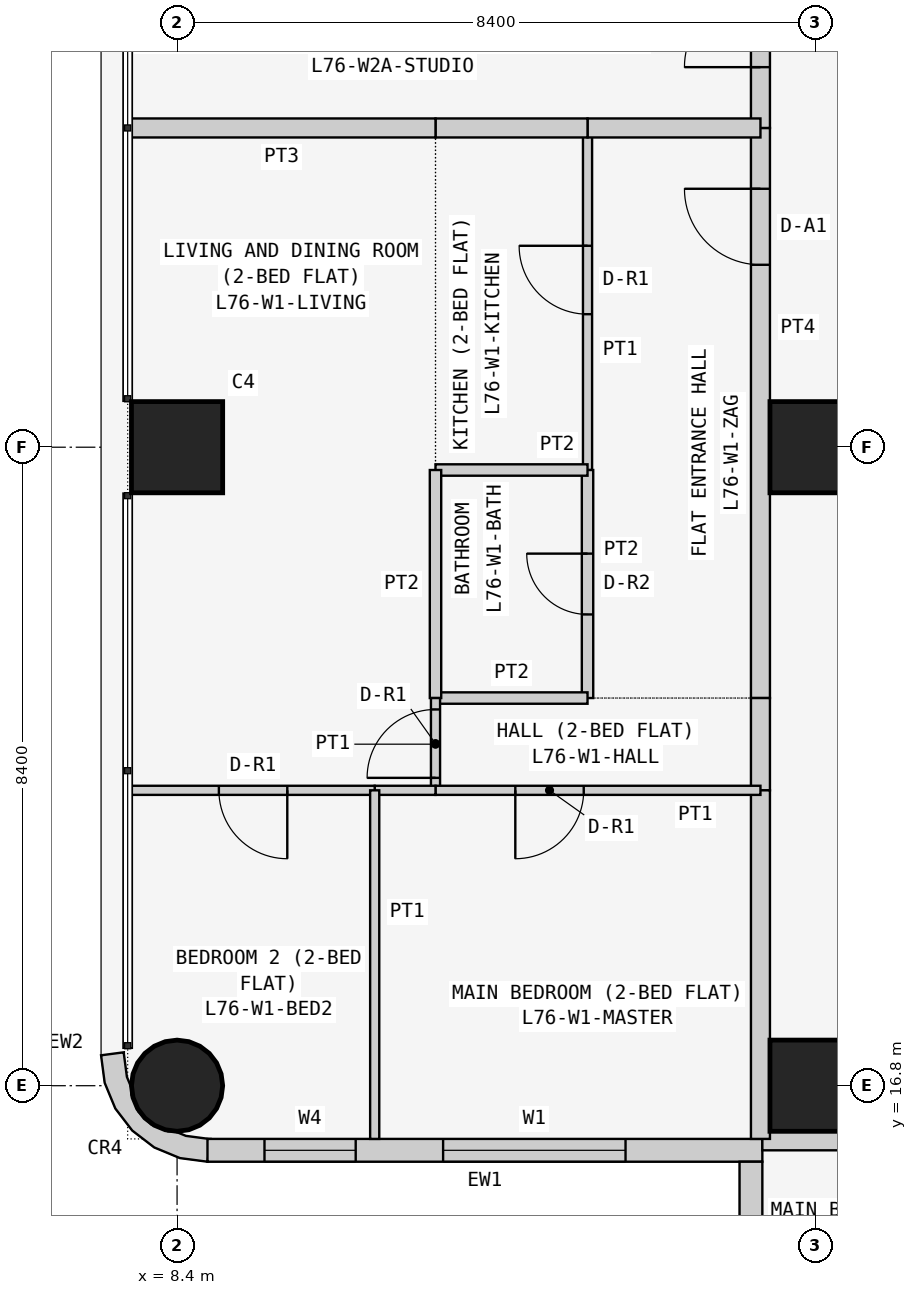
"""IFC4 building model, lengths in metres.
Left out: names, types, materials, properties, quantities, classifications, styles, units other than length and angle.
Written with IfcOpenShell. Run it as: python <this file> out.ifc"""

import sys

from ifc_helpers import new_model, si_unit, direction, frame, frame_2d, origin, origin_2d, place, context, subcontext, project, spatial, polyline, rectangle, circle, outline, extrude, element, fill, save


model = new_model("IFC4")
c1 = context("Model", 3, precision=1e-05, world=origin(), true_north=direction((0.0, 1.0)))
c2 = subcontext(c1, "Body", "Model", "MODEL_VIEW")
j1 = project(units=[si_unit("LENGTHUNIT", "METRE"), si_unit("PLANEANGLEUNIT", "RADIAN")], contexts=[c1])
p1 = place(None, origin())
s1 = spatial("IfcSite", under=j1, at=p1, CompositionType="ELEMENT")
p2 = place(p1, origin())
s2 = spatial("IfcBuilding", under=s1, at=p2, CompositionType="ELEMENT")
p3 = place(p2, frame((0.0, 0.0, 290.1)))
s3 = spatial("IfcBuildingStorey", under=s2, at=p3, CompositionType="ELEMENT", Elevation=290.1)
p4 = place(p3, frame((8.4, 16.8, 0.0), z_axis=(0.0, 0.0, 1.0), x_axis=(1.0, 0.0, 0.0)))
e1 = element("IfcColumn", 1, at=p4, inside=s3, PredefinedType="COLUMN", context=c2, shape_type="SweptSolid", body=[
    extrude(circle(Radius=0.6, at=origin_2d()), origin(), (0.0, 0.0, 1.0), 3.6),
])
for number, where, z_axis, x_axis in (
    (2, (8.4, 25.2, 0.0), (0.0, 0.0, 1.0), (1.0, 0.0, 0.0)),
    (3, (16.8, 16.8, 0.0), (0.0, 0.0, 1.0), (1.0, 0.0, 0.0)),
    (4, (16.8, 25.2, 0.0), (0.0, 0.0, 1.0), (1.0, 0.0, 0.0)),
):
    element("IfcColumn", number, at=place(p3, frame(where, z_axis=z_axis, x_axis=x_axis)), inside=s3, PredefinedType="COLUMN", context=c2, shape_type="SweptSolid", body=[
        extrude(rectangle(XDim=1.2, YDim=1.2, at=origin_2d()), origin(), (0.0, 0.0, 1.0), 3.6),
    ])
p5 = place(p3, frame((8.8, 15.95, 0.0), z_axis=(0.0, 0.0, 1.0), x_axis=(1.0, 0.0, 0.0)))
e5 = element("IfcWall", 5, at=p5, inside=s3, PredefinedType="SOLIDWALL", context=c2, shape_type="SweptSolid", body=[
    extrude(rectangle(XDim=7.3, YDim=0.3, at=frame_2d((3.65, 0.0))), origin(), (0.0, 0.0, 1.0), 3.45),
])
p6 = place(p5, frame((3.1, 0.0, 0.9)))
e6 = element("IfcOpeningElement", 6, at=p6, cuts=e5, PredefinedType="OPENING", context=c2, shape_type="SweptSolid", body=[
    extrude(rectangle(XDim=2.4, YDim=1.5, at=frame_2d((1.2, 0.75))), frame((0.0, 0.16, 0.0), z_axis=(0.0, -1.0, 0.0), x_axis=(1.0, 0.0, 0.0)), (0.0, 0.0, 1.0), 0.32),
])
p7 = place(p5, frame((0.75, 0.0, 0.9)))
e7 = element("IfcOpeningElement", 7, at=p7, cuts=e5, PredefinedType="OPENING", context=c2, shape_type="SweptSolid", body=[
    extrude(rectangle(XDim=1.2, YDim=1.5, at=frame_2d((0.6, 0.75))), frame((0.0, 0.16, 0.0), z_axis=(0.0, -1.0, 0.0), x_axis=(1.0, 0.0, 0.0)), (0.0, 0.0, 1.0), 0.32),
])
p8 = place(p3, frame((15.95, 15.8, 0.0), z_axis=(0.0, 0.0, 1.0), x_axis=(0.0, -1.0, 0.0)))
e8 = element("IfcWall", 8, at=p8, inside=s3, PredefinedType="SOLIDWALL", context=c2, shape_type="SweptSolid", body=[
    extrude(rectangle(XDim=7.0, YDim=0.3, at=frame_2d((3.5, 0.0))), origin(), (0.0, 0.0, 1.0), 3.45),
])
p9 = place(p8, frame((1.5, 0.0, 0.9)))
e9 = element("IfcOpeningElement", 9, at=p9, cuts=e8, PredefinedType="OPENING", context=c2, shape_type="SweptSolid", body=[
    extrude(rectangle(XDim=2.4, YDim=1.5, at=frame_2d((1.2, 0.75))), frame((0.0, 0.16, 0.0), z_axis=(0.0, -1.0, 0.0), x_axis=(1.0, 0.0, 0.0)), (0.0, 0.0, 1.0), 0.32),
])
p10 = place(p8, frame((5.05, 0.0, 0.9)))
e10 = element("IfcOpeningElement", 10, at=p10, cuts=e8, PredefinedType="OPENING", context=c2, shape_type="SweptSolid", body=[
    extrude(rectangle(XDim=1.2, YDim=1.5, at=frame_2d((0.6, 0.75))), frame((0.0, 0.16, 0.0), z_axis=(0.0, -1.0, 0.0), x_axis=(1.0, 0.0, 0.0)), (0.0, 0.0, 1.0), 0.32),
])
p11 = place(p3, frame((7.824, 17.162, 0.0), z_axis=(0.0, 0.0, 1.0), x_axis=(-0.707106781187, -0.707106781187, 0.0)))
e11 = element("IfcWall", 11, at=p11, inside=s3, PredefinedType="SOLIDWALL", context=c2, shape_type="SweptSolid", body=[
    extrude(outline(polyline([(0.047, 1.454), (0.233, 1.212), (0.292, 1.069), (0.358, 1.003), (0.449, 0.782), (0.449, 0.543), (0.358, 0.323), (0.292, 0.257), (0.233, 0.114), (0.047, -0.129), (0.033, -0.143), (0.273, -0.327), (0.495, -0.037), (0.635, 0.301), (0.683, 0.663), (0.635, 1.025), (0.495, 1.363), (0.273, 1.653), (0.033, 1.469), (0.047, 1.454)])), origin(), (0.0, 0.0, 1.0), 3.45),
])
p12 = place(p3, frame((20.686, 16.075, 0.0), z_axis=(0.0, 0.0, 1.0), x_axis=(-1.0, 0.0, 0.0)))
e12 = element("IfcWall", 12, at=p12, inside=s3, PredefinedType="PARTITIONING", context=c2, shape_type="SweptSolid", body=[
    extrude(rectangle(XDim=4.586, YDim=0.25, at=frame_2d((2.293, 0.0))), origin(), (0.0, 0.0, 1.0), 3.45),
])
p13 = place(p3, frame((16.075, 21.9, 0.0), z_axis=(0.0, 0.0, 1.0), x_axis=(0.0, 1.0, 0.0)))
e13 = element("IfcWall", 13, at=p13, inside=s3, PredefinedType="PARTITIONING", context=c2, shape_type="SweptSolid", body=[
    extrude(rectangle(XDim=7.5, YDim=0.25, at=frame_2d((3.75, 0.0))), origin(), (0.0, 0.0, 1.0), 3.45),
])
p14 = place(p13, frame((5.7, 0.0, 0.0)))
e14 = element("IfcOpeningElement", 14, at=p14, cuts=e13, PredefinedType="OPENING", context=c2, shape_type="SweptSolid", body=[
    extrude(rectangle(XDim=1.0, YDim=2.1, at=frame_2d((0.5, 1.05))), frame((0.0, 0.135, 0.0), z_axis=(0.0, -1.0, 0.0), x_axis=(1.0, 0.0, 0.0)), (0.0, 0.0, 1.0), 0.27),
])
p15 = place(p3, frame((16.075, 20.686, 0.0), z_axis=(0.0, 0.0, 1.0), x_axis=(0.0, 1.0, 0.0)))
e15 = element("IfcWall", 15, at=p15, inside=s3, PredefinedType="PARTITIONING", context=c2, shape_type="SweptSolid", body=[
    extrude(rectangle(XDim=1.214, YDim=0.25, at=frame_2d((0.607, 0.0))), origin(), (0.0, 0.0, 1.0), 3.45),
])
p16 = place(p3, frame((16.075, 16.1, 0.0), z_axis=(0.0, 0.0, 1.0), x_axis=(0.0, 1.0, 0.0)))
e16 = element("IfcWall", 16, at=p16, inside=s3, PredefinedType="PARTITIONING", context=c2, shape_type="SweptSolid", body=[
    extrude(rectangle(XDim=4.586, YDim=0.25, at=frame_2d((2.293, 0.0))), origin(), (0.0, 0.0, 1.0), 3.45),
])
p17 = place(p3, frame((16.075, 29.4, 0.0), z_axis=(0.0, 0.0, 1.0), x_axis=(0.0, 1.0, 0.0)))
e17 = element("IfcWall", 17, at=p17, inside=s3, PredefinedType="PARTITIONING", context=c2, shape_type="SweptSolid", body=[
    extrude(rectangle(XDim=2.6, YDim=0.25, at=frame_2d((1.3, 0.0))), origin(), (0.0, 0.0, 1.0), 3.45),
])
p18 = place(p17, frame((0.8, 0.0, 0.0)))
e18 = element("IfcOpeningElement", 18, at=p18, cuts=e17, PredefinedType="OPENING", context=c2, shape_type="SweptSolid", body=[
    extrude(rectangle(XDim=1.0, YDim=2.1, at=frame_2d((0.5, 1.05))), frame((0.0, 0.135, 0.0), z_axis=(0.0, -1.0, 0.0), x_axis=(1.0, 0.0, 0.0)), (0.0, 0.0, 1.0), 0.27),
])
p19 = place(p3, frame((13.8, 29.4, 0.0), z_axis=(0.0, 0.0, 1.0), x_axis=(0.0, -1.0, 0.0)))
e19 = element("IfcWall", 19, at=p19, inside=s3, PredefinedType="PARTITIONING", context=c2, shape_type="SweptSolid", body=[
    extrude(rectangle(XDim=4.5, YDim=0.12, at=frame_2d((2.25, 0.0))), origin(), (0.0, 0.0, 1.0), 3.45),
])
p20 = place(p19, frame((1.55, 0.0, 0.0)))
e20 = element("IfcOpeningElement", 20, at=p20, cuts=e19, PredefinedType="OPENING", context=c2, shape_type="SweptSolid", body=[
    extrude(rectangle(XDim=0.9, YDim=2.1, at=frame_2d((0.45, 1.05))), frame((0.0, 0.07, 0.0), z_axis=(0.0, -1.0, 0.0), x_axis=(1.0, 0.0, 0.0)), (0.0, 0.0, 1.0), 0.14),
])
p21 = place(p3, frame((13.8, 24.9, 0.0), z_axis=(0.0, 0.0, 1.0), x_axis=(0.0, -1.0, 0.0)))
e21 = element("IfcWall", 21, at=p21, inside=s3, PredefinedType="PARTITIONING", context=c2, shape_type="SweptSolid", body=[
    extrude(rectangle(XDim=3.0, YDim=0.15, at=frame_2d((1.5, 0.0))), origin(), (0.0, 0.0, 1.0), 3.45),
])
p22 = place(p21, frame((1.1, 0.0, 0.0)))
e22 = element("IfcOpeningElement", 22, at=p22, cuts=e21, PredefinedType="OPENING", context=c2, shape_type="SweptSolid", body=[
    extrude(rectangle(XDim=0.8, YDim=2.1, at=frame_2d((0.4, 1.05))), frame((0.0, 0.085, 0.0), z_axis=(0.0, -1.0, 0.0), x_axis=(1.0, 0.0, 0.0)), (0.0, 0.0, 1.0), 0.17),
])
p23 = place(p3, frame((16.075, 29.4, 0.0), z_axis=(0.0, 0.0, 1.0), x_axis=(-1.0, 0.0, 0.0)))
e23 = element("IfcWall", 23, at=p23, inside=s3, PredefinedType="PARTITIONING", context=c2, shape_type="SweptSolid", body=[
    extrude(rectangle(XDim=2.275, YDim=0.25, at=frame_2d((1.137, 0.0))), origin(), (0.0, 0.0, 1.0), 3.45),
])
p24 = place(p3, frame((11.8, 24.9, 0.0), z_axis=(0.0, 0.0, 1.0), x_axis=(1.0, 0.0, 0.0)))
e24 = element("IfcWall", 24, at=p24, inside=s3, PredefinedType="PARTITIONING", context=c2, shape_type="SweptSolid", body=[
    extrude(rectangle(XDim=2.0, YDim=0.15, at=frame_2d((1.0, 0.0))), origin(), (0.0, 0.0, 1.0), 3.45),
])
p25 = place(p3, frame((13.8, 29.4, 0.0), z_axis=(0.0, 0.0, 1.0), x_axis=(-1.0, 0.0, 0.0)))
e25 = element("IfcWall", 25, at=p25, inside=s3, PredefinedType="PARTITIONING", context=c2, shape_type="SweptSolid", body=[
    extrude(rectangle(XDim=2.0, YDim=0.25, at=frame_2d((1.0, 0.0))), origin(), (0.0, 0.0, 1.0), 3.45),
])
p26 = place(p3, frame((11.8, 21.9, 0.0), z_axis=(0.0, 0.0, 1.0), x_axis=(1.0, 0.0, 0.0)))
e26 = element("IfcWall", 26, at=p26, inside=s3, PredefinedType="PARTITIONING", context=c2, shape_type="SweptSolid", body=[
    extrude(rectangle(XDim=2.0, YDim=0.15, at=frame_2d((1.0, 0.0))), origin(), (0.0, 0.0, 1.0), 3.45),
])
p27 = place(p3, frame((11.8, 24.9, 0.0), z_axis=(0.0, 0.0, 1.0), x_axis=(0.0, -1.0, 0.0)))
e27 = element("IfcWall", 27, at=p27, inside=s3, PredefinedType="PARTITIONING", context=c2, shape_type="SweptSolid", body=[
    extrude(rectangle(XDim=3.0, YDim=0.15, at=frame_2d((1.5, 0.0))), origin(), (0.0, 0.0, 1.0), 3.45),
])
p28 = place(p3, frame((11.8, 21.9, 0.0), z_axis=(0.0, 0.0, 1.0), x_axis=(0.0, -1.0, 0.0)))
e28 = element("IfcWall", 28, at=p28, inside=s3, PredefinedType="PARTITIONING", context=c2, shape_type="SweptSolid", body=[
    extrude(rectangle(XDim=1.214, YDim=0.12, at=frame_2d((0.607, 0.0))), origin(), (0.0, 0.0, 1.0), 3.45),
])
p29 = place(p28, frame((0.15, 0.0, 0.0)))
e29 = element("IfcOpeningElement", 29, at=p29, cuts=e28, PredefinedType="OPENING", context=c2, shape_type="SweptSolid", body=[
    extrude(rectangle(XDim=0.9, YDim=2.1, at=frame_2d((0.45, 1.05))), frame((0.0, 0.07, 0.0), z_axis=(0.0, -1.0, 0.0), x_axis=(1.0, 0.0, 0.0)), (0.0, 0.0, 1.0), 0.14),
])
p30 = place(p3, frame((11.8, 20.686, 0.0), z_axis=(0.0, 0.0, 1.0), x_axis=(1.0, 0.0, 0.0)))
e30 = element("IfcWall", 30, at=p30, inside=s3, PredefinedType="PARTITIONING", context=c2, shape_type="SweptSolid", body=[
    extrude(rectangle(XDim=4.275, YDim=0.12, at=frame_2d((2.137, 0.0))), origin(), (0.0, 0.0, 1.0), 3.45),
])
p31 = place(p30, frame((1.05, 0.0, 0.0)))
e31 = element("IfcOpeningElement", 31, at=p31, cuts=e30, PredefinedType="OPENING", context=c2, shape_type="SweptSolid", body=[
    extrude(rectangle(XDim=0.9, YDim=2.1, at=frame_2d((0.45, 1.05))), frame((0.0, 0.07, 0.0), z_axis=(0.0, -1.0, 0.0), x_axis=(1.0, 0.0, 0.0)), (0.0, 0.0, 1.0), 0.14),
])
p32 = place(p3, frame((11.0, 20.686, 0.0), z_axis=(0.0, 0.0, 1.0), x_axis=(1.0, 0.0, 0.0)))
e32 = element("IfcWall", 32, at=p32, inside=s3, PredefinedType="PARTITIONING", context=c2, shape_type="SweptSolid", body=[
    extrude(rectangle(XDim=0.8, YDim=0.12, at=frame_2d((0.4, 0.0))), origin(), (0.0, 0.0, 1.0), 3.45),
])
p33 = place(p3, frame((7.75, 20.686, 0.0), z_axis=(0.0, 0.0, 1.0), x_axis=(1.0, 0.0, 0.0)))
e33 = element("IfcWall", 33, at=p33, inside=s3, PredefinedType="PARTITIONING", context=c2, shape_type="SweptSolid", body=[
    extrude(rectangle(XDim=3.25, YDim=0.12, at=frame_2d((1.625, 0.0))), origin(), (0.0, 0.0, 1.0), 3.45),
])
p34 = place(p33, frame((1.2, 0.0, 0.0)))
e34 = element("IfcOpeningElement", 34, at=p34, cuts=e33, PredefinedType="OPENING", context=c2, shape_type="SweptSolid", body=[
    extrude(rectangle(XDim=0.9, YDim=2.1, at=frame_2d((0.45, 1.05))), frame((0.0, 0.07, 0.0), z_axis=(0.0, -1.0, 0.0), x_axis=(1.0, 0.0, 0.0)), (0.0, 0.0, 1.0), 0.14),
])
p35 = place(p3, frame((11.8, 29.4, 0.0), z_axis=(0.0, 0.0, 1.0), x_axis=(-1.0, 0.0, 0.0)))
e35 = element("IfcWall", 35, at=p35, inside=s3, PredefinedType="PARTITIONING", context=c2, shape_type="SweptSolid", body=[
    extrude(rectangle(XDim=4.05, YDim=0.25, at=frame_2d((2.025, 0.0))), origin(), (0.0, 0.0, 1.0), 3.45),
])
p36 = place(p3, frame((11.0, 20.686, 0.0), z_axis=(0.0, 0.0, 1.0), x_axis=(0.0, -1.0, 0.0)))
e36 = element("IfcWall", 36, at=p36, inside=s3, PredefinedType="PARTITIONING", context=c2, shape_type="SweptSolid", body=[
    extrude(rectangle(XDim=4.586, YDim=0.12, at=frame_2d((2.293, 0.0))), origin(), (0.0, 0.0, 1.0), 3.45),
])
p37 = place(p6, origin())
e37 = element("IfcWindow", 37, at=p37, inside=s3, PartitioningType="SINGLE_PANEL", PredefinedType="WINDOW", context=c2, shape_type="SweptSolid", body=[
    extrude(rectangle(XDim=2.4, YDim=1.5, at=frame_2d((1.2, 0.75))), frame((0.0, 0.03, 0.0), z_axis=(0.0, -1.0, 0.0), x_axis=(1.0, 0.0, 0.0)), (0.0, 0.0, 1.0), 0.06),
])
fill(e6, e37)
p38 = place(p7, origin())
e38 = element("IfcWindow", 38, at=p38, inside=s3, PartitioningType="SINGLE_PANEL", PredefinedType="WINDOW", context=c2, shape_type="SweptSolid", body=[
    extrude(rectangle(XDim=1.2, YDim=1.5, at=frame_2d((0.6, 0.75))), frame((0.0, 0.03, 0.0), z_axis=(0.0, -1.0, 0.0), x_axis=(1.0, 0.0, 0.0)), (0.0, 0.0, 1.0), 0.06),
])
fill(e7, e38)
p39 = place(p14, origin())
e39 = element("IfcDoor", 39, at=p39, inside=s3, OperationType="SINGLE_SWING_RIGHT", PredefinedType="DOOR", context=c2, shape_type="SweptSolid", body=[
    extrude(rectangle(XDim=1.0, YDim=2.1, at=frame_2d((0.5, 1.05))), frame((0.0, 0.025, 0.0), z_axis=(0.0, -1.0, 0.0), x_axis=(1.0, 0.0, 0.0)), (0.0, 0.0, 1.0), 0.05),
])
fill(e14, e39)
p40 = place(p20, frame((0.9, 0.0, 0.0), z_axis=(0.0, 0.0, 1.0), x_axis=(-1.0, 0.0, 0.0)))
e40 = element("IfcDoor", 40, at=p40, inside=s3, OperationType="SINGLE_SWING_RIGHT", PredefinedType="DOOR", context=c2, shape_type="SweptSolid", body=[
    extrude(rectangle(XDim=0.9, YDim=2.1, at=frame_2d((0.45, 1.05))), frame((0.0, 0.025, 0.0), z_axis=(0.0, -1.0, 0.0), x_axis=(1.0, 0.0, 0.0)), (0.0, 0.0, 1.0), 0.05),
])
fill(e20, e40)
p41 = place(p22, frame((0.8, 0.0, 0.0), z_axis=(0.0, 0.0, 1.0), x_axis=(-1.0, 0.0, 0.0)))
e41 = element("IfcDoor", 41, at=p41, inside=s3, OperationType="SINGLE_SWING_RIGHT", PredefinedType="DOOR", context=c2, shape_type="SweptSolid", body=[
    extrude(rectangle(XDim=0.8, YDim=2.1, at=frame_2d((0.4, 1.05))), frame((0.0, 0.025, 0.0), z_axis=(0.0, -1.0, 0.0), x_axis=(1.0, 0.0, 0.0)), (0.0, 0.0, 1.0), 0.05),
])
fill(e22, e41)
p42 = place(p29, frame((0.9, 0.0, 0.0), z_axis=(0.0, 0.0, 1.0), x_axis=(-1.0, 0.0, 0.0)))
e42 = element("IfcDoor", 42, at=p42, inside=s3, OperationType="SINGLE_SWING_LEFT", PredefinedType="DOOR", context=c2, shape_type="SweptSolid", body=[
    extrude(rectangle(XDim=0.9, YDim=2.1, at=frame_2d((0.45, 1.05))), frame((0.0, 0.025, 0.0), z_axis=(0.0, -1.0, 0.0), x_axis=(1.0, 0.0, 0.0)), (0.0, 0.0, 1.0), 0.05),
])
fill(e29, e42)
p43 = place(p31, frame((0.9, 0.0, 0.0), z_axis=(0.0, 0.0, 1.0), x_axis=(-1.0, 0.0, 0.0)))
e43 = element("IfcDoor", 43, at=p43, inside=s3, OperationType="SINGLE_SWING_RIGHT", PredefinedType="DOOR", context=c2, shape_type="SweptSolid", body=[
    extrude(rectangle(XDim=0.9, YDim=2.1, at=frame_2d((0.45, 1.05))), frame((0.0, 0.025, 0.0), z_axis=(0.0, -1.0, 0.0), x_axis=(1.0, 0.0, 0.0)), (0.0, 0.0, 1.0), 0.05),
])
fill(e31, e43)
p44 = place(p34, frame((0.9, 0.0, 0.0), z_axis=(0.0, 0.0, 1.0), x_axis=(-1.0, 0.0, 0.0)))
e44 = element("IfcDoor", 44, at=p44, inside=s3, OperationType="SINGLE_SWING_LEFT", PredefinedType="DOOR", context=c2, shape_type="SweptSolid", body=[
    extrude(rectangle(XDim=0.9, YDim=2.1, at=frame_2d((0.45, 1.05))), frame((0.0, 0.025, 0.0), z_axis=(0.0, -1.0, 0.0), x_axis=(1.0, 0.0, 0.0)), (0.0, 0.0, 1.0), 0.05),
])
fill(e34, e44)
p45 = place(p18, origin())
e45 = element("IfcDoor", 45, at=p45, inside=s3, OperationType="SINGLE_SWING_LEFT", PredefinedType="DOOR", context=c2, shape_type="SweptSolid", body=[
    extrude(rectangle(XDim=1.0, YDim=2.1, at=frame_2d((0.5, 1.05))), frame((0.0, 0.025, 0.0), z_axis=(0.0, -1.0, 0.0), x_axis=(1.0, 0.0, 0.0)), (0.0, 0.0, 1.0), 0.05),
])
fill(e18, e45)
save(model, sys.argv[1])
